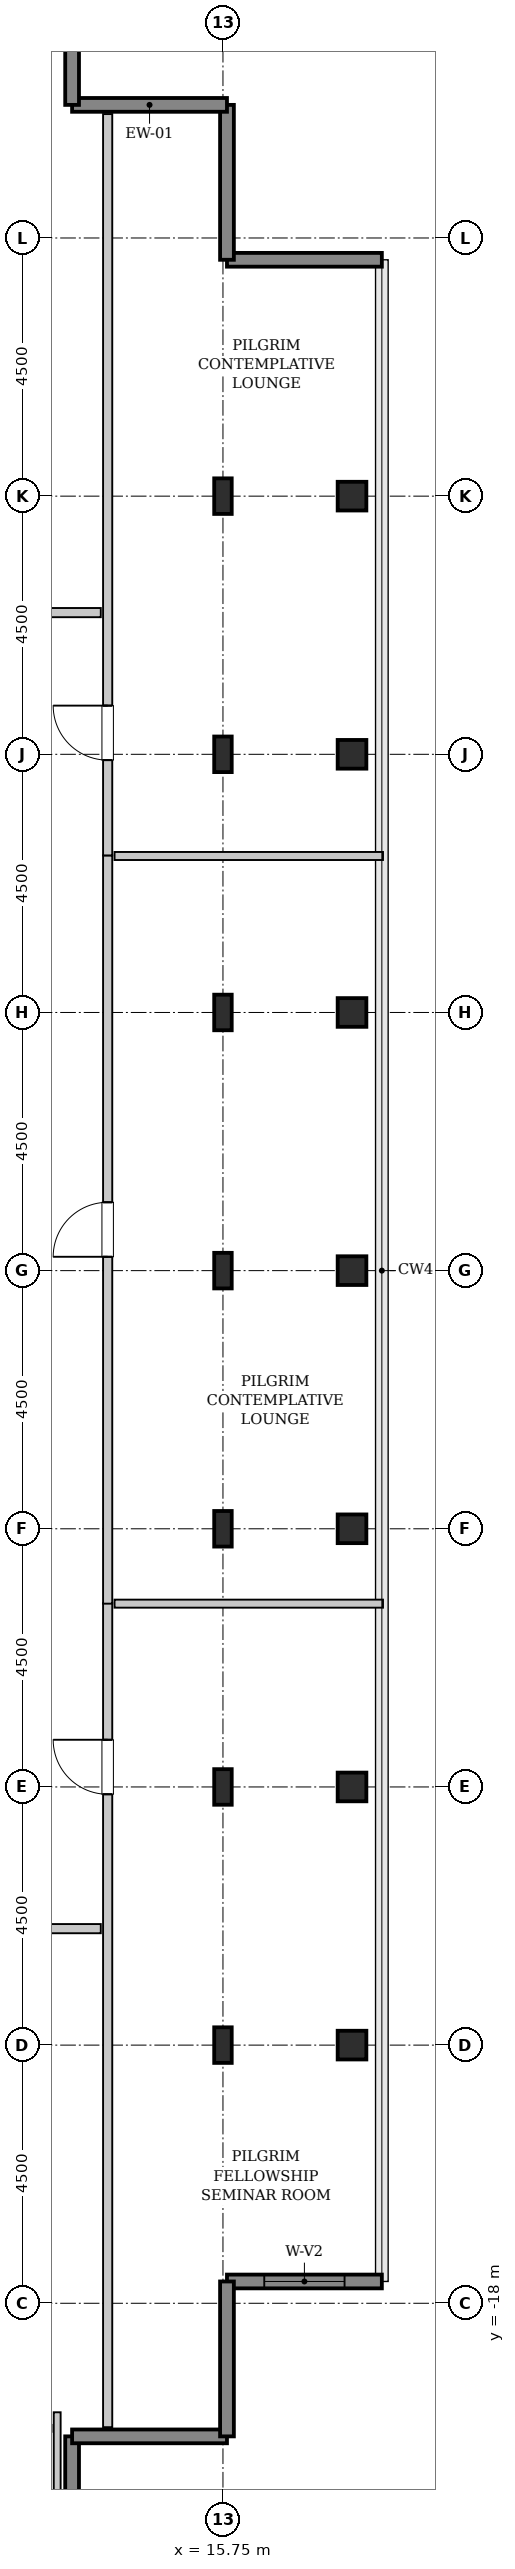
"""IFC4 building model, lengths in metres.
Left out: names, types, materials, properties, quantities, classifications, styles, units other than length and angle.
Written with IfcOpenShell. Run it as: python <this file> out.ifc"""

import sys

from ifc_helpers import new_model, si_unit, direction, frame, frame_2d, origin, origin_2d, place, context, subcontext, project, spatial, rectangle, hollow_rectangle, i_section, extrude, source, transform, mapped, element, fill, save


model = new_model("IFC4")
c1 = context("Model", 3, precision=1e-05, world=origin(), true_north=direction((0.0, 1.0)))
c2 = subcontext(c1, "Body", "Model", "MODEL_VIEW")
j1 = project(units=[si_unit("LENGTHUNIT", "METRE"), si_unit("PLANEANGLEUNIT", "RADIAN")], contexts=[c1])
p1 = place(None, origin())
s1 = spatial("IfcSite", under=j1, at=p1, CompositionType="ELEMENT")
p2 = place(p1, origin())
s2 = spatial("IfcBuilding", under=s1, at=p2, CompositionType="ELEMENT")
p3 = place(p2, frame((0.0, 0.0, 302.6)))
s3 = spatial("IfcBuildingStorey", under=s2, at=p3, CompositionType="ELEMENT", Elevation=302.6)
m1 = source(origin(), c2, "Body", "SweptSolid", [
    extrude(i_section(OverallWidth=0.305, OverallDepth=0.62, WebThickness=0.021, FlangeThickness=0.04, FilletRadius=0.027, at=origin_2d()), origin(), (0.0, 0.0, 1.0), 3.8),
])
for number, where, z_axis, x_axis in (
    (1, (15.75, -13.5, 0.0), (0.0, 0.0, 1.0), (1.0, 0.0, 0.0)),
    (2, (15.75, -9.0, 0.0), (0.0, 0.0, 1.0), (1.0, 0.0, 0.0)),
    (3, (15.75, -4.5, 0.0), (0.0, 0.0, 1.0), (1.0, 0.0, 0.0)),
    (4, (15.75, 0.0, 0.0), (0.0, 0.0, 1.0), (1.0, 0.0, 0.0)),
    (5, (15.75, 4.5, 0.0), (0.0, 0.0, 1.0), (1.0, 0.0, 0.0)),
    (6, (15.75, 9.0, 0.0), (0.0, 0.0, 1.0), (1.0, 0.0, 0.0)),
    (7, (15.75, 13.5, 0.0), (0.0, 0.0, 1.0), (1.0, 0.0, 0.0)),
):
    element("IfcColumn", number, at=place(p3, frame(where, z_axis=z_axis, x_axis=x_axis)), inside=s3, PredefinedType="COLUMN", context=c2, shape_type="MappedRepresentation", body=[
        mapped(m1, transform((0.0, 0.0, 0.0), x_axis=(1.0, 0.0, 0.0), y_axis=(0.0, 1.0, 0.0), z_axis=(0.0, 0.0, 1.0), scale=1.0)),
    ])
m2 = source(origin(), c2, "Body", "SweptSolid", [
    extrude(hollow_rectangle(XDim=0.5, YDim=0.5, WallThickness=0.025, InnerFilletRadius=0.025, OuterFilletRadius=0.05, at=origin_2d()), origin(), (0.0, 0.0, 1.0), 3.8),
])
for number, where, z_axis, x_axis in (
    (8, (18.0, -13.5, 0.0), (0.0, 0.0, 1.0), (1.0, 0.0, 0.0)),
    (9, (18.0, -9.0, 0.0), (0.0, 0.0, 1.0), (1.0, 0.0, 0.0)),
    (10, (18.0, -4.5, 0.0), (0.0, 0.0, 1.0), (1.0, 0.0, 0.0)),
    (11, (18.0, 0.0, 0.0), (0.0, 0.0, 1.0), (1.0, 0.0, 0.0)),
    (12, (18.0, 4.5, 0.0), (0.0, 0.0, 1.0), (1.0, 0.0, 0.0)),
    (13, (18.0, 9.0, 0.0), (0.0, 0.0, 1.0), (1.0, 0.0, 0.0)),
    (14, (18.0, 13.5, 0.0), (0.0, 0.0, 1.0), (1.0, 0.0, 0.0)),
):
    element("IfcColumn", number, at=place(p3, frame(where, z_axis=z_axis, x_axis=x_axis)), inside=s3, PredefinedType="COLUMN", context=c2, shape_type="MappedRepresentation", body=[
        mapped(m2, transform((0.0, 0.0, 0.0), x_axis=(1.0, 0.0, 0.0), y_axis=(0.0, 1.0, 0.0), z_axis=(0.0, 0.0, 1.0), scale=1.0)),
    ])
m3 = source(origin(), c2, "Body", "SweptSolid", [
    extrude(rectangle(XDim=2.7, YDim=0.24, at=frame_2d((1.35, 0.0))), origin(), (0.0, 0.0, 1.0), 3.55),
])
p4 = place(p3, frame((15.82, -17.62, 0.0), z_axis=(0.0, 0.0, 1.0), x_axis=(1.0, 0.0, 0.0)))
e15 = element("IfcWall", 15, at=p4, inside=s3, PredefinedType="SHEAR", context=c2, shape_type="MappedRepresentation", body=[
    mapped(m3, transform((0.0, 0.0, 0.0), x_axis=(1.0, 0.0, 0.0), y_axis=(0.0, 1.0, 0.0), z_axis=(0.0, 0.0, 1.0), scale=1.0)),
])
p5 = place(p4, frame((0.65, 0.0, 0.85)))
e16 = element("IfcOpeningElement", 16, at=p5, cuts=e15, PredefinedType="OPENING", context=c2, shape_type="SweptSolid", body=[
    extrude(rectangle(XDim=1.4, YDim=1.8, at=frame_2d((0.7, 0.9))), frame((0.0, 0.13, 0.0), z_axis=(0.0, -1.0, 0.0), x_axis=(1.0, 0.0, 0.0)), (0.0, 0.0, 1.0), 0.26),
])
for number, where, z_axis, x_axis in (
    (17, (18.52, 17.62, 0.0), (0.0, 0.0, 1.0), (-1.0, 0.0, 0.0)),
    (18, (15.82, 17.62, 0.0), (0.0, 0.0, 1.0), (0.0, 1.0, 0.0)),
    (19, (15.82, 20.32, 0.0), (0.0, 0.0, 1.0), (-1.0, 0.0, 0.0)),
    (20, (13.12, 20.32, 0.0), (0.0, 0.0, 1.0), (0.0, 1.0, 0.0)),
    (21, (13.12, -23.02, 0.0), (0.0, 0.0, 1.0), (0.0, 1.0, 0.0)),
    (22, (13.12, -20.32, 0.0), (0.0, 0.0, 1.0), (1.0, 0.0, 0.0)),
    (23, (15.82, -20.32, 0.0), (0.0, 0.0, 1.0), (0.0, 1.0, 0.0)),
):
    element("IfcWall", number, at=place(p3, frame(where, z_axis=z_axis, x_axis=x_axis)), inside=s3, PredefinedType="SHEAR", context=c2, shape_type="MappedRepresentation", body=[
        mapped(m3, transform((0.0, 0.0, 0.0), x_axis=(1.0, 0.0, 0.0), y_axis=(0.0, 1.0, 0.0), z_axis=(0.0, 0.0, 1.0), scale=1.0)),
    ])
m4 = source(origin(), c2, "Body", "SweptSolid", [
    extrude(rectangle(XDim=2.76, YDim=0.12, at=frame_2d((1.38, 0.0))), origin(), (0.0, 0.0, 1.0), 3.535),
])
p6 = place(p3, frame((12.86, -22.66, 0.0), z_axis=(0.0, 0.0, 1.0), x_axis=(0.0, 1.0, 0.0)))
e24 = element("IfcWall", 24, at=p6, inside=s3, PredefinedType="PLUMBINGWALL", context=c2, shape_type="MappedRepresentation", body=[
    mapped(m4, transform((0.0, 0.0, 0.0), x_axis=(1.0, 0.0, 0.0), y_axis=(0.0, 1.0, 0.0), z_axis=(0.0, 0.0, 1.0), scale=1.0)),
])
m5 = source(origin(), c2, "Body", "SweptSolid", [
    extrude(rectangle(XDim=14.365, YDim=0.16, at=frame_2d((7.183, 0.0))), origin(), (0.0, 0.0, 1.0), 3.535),
])
p7 = place(p3, frame((13.74, -20.16, 0.0), z_axis=(0.0, 0.0, 1.0), x_axis=(0.0, 1.0, 0.0)))
e25 = element("IfcWall", 25, at=p7, inside=s3, PredefinedType="PARTITIONING", context=c2, shape_type="MappedRepresentation", body=[
    mapped(m5, transform((0.0, 0.0, 0.0), x_axis=(1.0, 0.0, 0.0), y_axis=(0.0, 1.0, 0.0), z_axis=(0.0, 0.0, 1.0), scale=1.0)),
])
p8 = place(p7, frame((11.032, 0.0, 0.0)))
e26 = element("IfcOpeningElement", 26, at=p8, cuts=e25, PredefinedType="OPENING", context=c2, shape_type="SweptSolid", body=[
    extrude(rectangle(XDim=0.95, YDim=2.1, at=frame_2d((0.475, 1.05))), frame((0.0, 0.09, 0.0), z_axis=(0.0, -1.0, 0.0), x_axis=(1.0, 0.0, 0.0)), (0.0, 0.0, 1.0), 0.18),
])
m6 = source(origin(), c2, "Body", "SweptSolid", [
    extrude(rectangle(XDim=4.68, YDim=0.14, at=frame_2d((2.34, 0.0))), origin(), (0.0, 0.0, 1.0), 3.535),
])
p9 = place(p3, frame((13.86, -5.805, 0.0), z_axis=(0.0, 0.0, 1.0), x_axis=(1.0, 0.0, 0.0)))
e27 = element("IfcWall", 27, at=p9, inside=s3, PredefinedType="PARTITIONING", context=c2, shape_type="MappedRepresentation", body=[
    mapped(m6, transform((0.0, 0.0, 0.0), x_axis=(1.0, 0.0, 0.0), y_axis=(0.0, 1.0, 0.0), z_axis=(0.0, 0.0, 1.0), scale=1.0)),
])
m7 = source(origin(), c2, "Body", "SweptSolid", [
    extrude(rectangle(XDim=13.042, YDim=0.16, at=frame_2d((6.521, 0.0))), origin(), (0.0, 0.0, 1.0), 3.535),
])
p10 = place(p3, frame((13.74, -5.805, 0.0), z_axis=(0.0, 0.0, 1.0), x_axis=(0.0, 1.0, 0.0)))
e28 = element("IfcWall", 28, at=p10, inside=s3, PredefinedType="PARTITIONING", context=c2, shape_type="MappedRepresentation", body=[
    mapped(m7, transform((0.0, 0.0, 0.0), x_axis=(1.0, 0.0, 0.0), y_axis=(0.0, 1.0, 0.0), z_axis=(0.0, 0.0, 1.0), scale=1.0)),
])
p11 = place(p10, frame((6.046, 0.0, 0.0)))
e29 = element("IfcOpeningElement", 29, at=p11, cuts=e28, PredefinedType="OPENING", context=c2, shape_type="SweptSolid", body=[
    extrude(rectangle(XDim=0.95, YDim=2.1, at=frame_2d((0.475, 1.05))), frame((0.0, 0.09, 0.0), z_axis=(0.0, -1.0, 0.0), x_axis=(1.0, 0.0, 0.0)), (0.0, 0.0, 1.0), 0.18),
])
p12 = place(p3, frame((13.86, 7.228, 0.0), z_axis=(0.0, 0.0, 1.0), x_axis=(1.0, 0.0, 0.0)))
e30 = element("IfcWall", 30, at=p12, inside=s3, PredefinedType="PARTITIONING", context=c2, shape_type="MappedRepresentation", body=[
    mapped(m6, transform((0.0, 0.0, 0.0), x_axis=(1.0, 0.0, 0.0), y_axis=(0.0, 1.0, 0.0), z_axis=(0.0, 0.0, 1.0), scale=1.0)),
])
m8 = source(origin(), c2, "Body", "SweptSolid", [
    extrude(rectangle(XDim=12.922, YDim=0.16, at=frame_2d((6.461, 0.0))), origin(), (0.0, 0.0, 1.0), 3.535),
])
p13 = place(p3, frame((13.74, 7.238, 0.0), z_axis=(0.0, 0.0, 1.0), x_axis=(0.0, 1.0, 0.0)))
e31 = element("IfcWall", 31, at=p13, inside=s3, PredefinedType="PARTITIONING", context=c2, shape_type="MappedRepresentation", body=[
    mapped(m8, transform((0.0, 0.0, 0.0), x_axis=(1.0, 0.0, 0.0), y_axis=(0.0, 1.0, 0.0), z_axis=(0.0, 0.0, 1.0), scale=1.0)),
])
p14 = place(p13, frame((1.661, 0.0, 0.0)))
e32 = element("IfcOpeningElement", 32, at=p14, cuts=e31, PredefinedType="OPENING", context=c2, shape_type="SweptSolid", body=[
    extrude(rectangle(XDim=0.95, YDim=2.1, at=frame_2d((0.475, 1.05))), frame((0.0, 0.09, 0.0), z_axis=(0.0, -1.0, 0.0), x_axis=(1.0, 0.0, 0.0)), (0.0, 0.0, 1.0), 0.18),
])
m9 = source(origin(), c2, "Body", "SweptSolid", [
    extrude(rectangle(XDim=5.225, YDim=0.16, at=frame_2d((2.613, 0.0))), origin(), (0.0, 0.0, 1.0), 3.535),
])
p15 = place(p3, frame((8.395, 11.47, 0.0), z_axis=(0.0, 0.0, 1.0), x_axis=(1.0, 0.0, 0.0)))
e33 = element("IfcWall", 33, at=p15, inside=s3, PredefinedType="PARTITIONING", context=c2, shape_type="MappedRepresentation", body=[
    mapped(m9, transform((0.0, 0.0, 0.0), x_axis=(1.0, 0.0, 0.0), y_axis=(0.0, 1.0, 0.0), z_axis=(0.0, 0.0, 1.0), scale=1.0)),
])
p16 = place(p15, frame((2.137, 0.0, 0.0)))
e34 = element("IfcOpeningElement", 34, at=p16, cuts=e33, PredefinedType="OPENING", context=c2, shape_type="SweptSolid", body=[
    extrude(rectangle(XDim=0.95, YDim=2.1, at=frame_2d((0.475, 1.05))), frame((0.0, 0.09, 0.0), z_axis=(0.0, -1.0, 0.0), x_axis=(1.0, 0.0, 0.0)), (0.0, 0.0, 1.0), 0.18),
])
m10 = source(origin(), c2, "Body", "SweptSolid", [
    extrude(rectangle(XDim=3.56, YDim=0.16, at=frame_2d((1.78, 0.0))), origin(), (0.0, 0.0, 1.0), 3.535),
])
p17 = place(p3, frame((10.06, -11.47, 0.0), z_axis=(0.0, 0.0, 1.0), x_axis=(1.0, 0.0, 0.0)))
e35 = element("IfcWall", 35, at=p17, inside=s3, PredefinedType="PARTITIONING", context=c2, shape_type="MappedRepresentation", body=[
    mapped(m10, transform((0.0, 0.0, 0.0), x_axis=(1.0, 0.0, 0.0), y_axis=(0.0, 1.0, 0.0), z_axis=(0.0, 0.0, 1.0), scale=1.0)),
])
p18 = place(p17, frame((1.305, 0.0, 0.0)))
e36 = element("IfcOpeningElement", 36, at=p18, cuts=e35, PredefinedType="OPENING", context=c2, shape_type="SweptSolid", body=[
    extrude(rectangle(XDim=0.95, YDim=2.1, at=frame_2d((0.475, 1.05))), frame((0.0, 0.09, 0.0), z_axis=(0.0, -1.0, 0.0), x_axis=(1.0, 0.0, 0.0)), (0.0, 0.0, 1.0), 0.18),
])
m11 = source(origin(), c2, "Body", "SweptSolid", [
    extrude(rectangle(XDim=1.4, YDim=1.8, at=frame_2d((0.7, 0.9))), frame((0.0, 0.03, 0.0), z_axis=(0.0, -1.0, 0.0), x_axis=(1.0, 0.0, 0.0)), (0.0, 0.0, 1.0), 0.06),
])
p19 = place(p5, origin())
e37 = element("IfcWindow", 37, at=p19, inside=s3, PartitioningType="SINGLE_PANEL", PredefinedType="WINDOW", context=c2, shape_type="MappedRepresentation", body=[
    mapped(m11, transform((0.0, 0.0, 0.0), x_axis=(1.0, 0.0, 0.0), y_axis=(0.0, 1.0, 0.0), z_axis=(0.0, 0.0, 1.0), scale=1.0)),
])
fill(e16, e37)
m12 = source(origin(), c2, "Body", "SweptSolid", [
    extrude(rectangle(XDim=0.95, YDim=2.1, at=frame_2d((0.475, 1.05))), frame((0.0, 0.025, 0.0), z_axis=(0.0, -1.0, 0.0), x_axis=(1.0, 0.0, 0.0)), (0.0, 0.0, 1.0), 0.05),
])
p20 = place(p8, origin())
e38 = element("IfcDoor", 38, at=p20, inside=s3, OperationType="SINGLE_SWING_RIGHT", PredefinedType="DOOR", context=c2, shape_type="MappedRepresentation", body=[
    mapped(m12, transform((0.0, 0.0, 0.0), x_axis=(1.0, 0.0, 0.0), y_axis=(0.0, 1.0, 0.0), z_axis=(0.0, 0.0, 1.0), scale=1.0)),
])
fill(e26, e38)
p21 = place(p11, origin())
e39 = element("IfcDoor", 39, at=p21, inside=s3, OperationType="SINGLE_SWING_LEFT", PredefinedType="DOOR", context=c2, shape_type="MappedRepresentation", body=[
    mapped(m12, transform((0.0, 0.0, 0.0), x_axis=(1.0, 0.0, 0.0), y_axis=(0.0, 1.0, 0.0), z_axis=(0.0, 0.0, 1.0), scale=1.0)),
])
fill(e29, e39)
p22 = place(p14, origin())
e40 = element("IfcDoor", 40, at=p22, inside=s3, OperationType="SINGLE_SWING_RIGHT", PredefinedType="DOOR", context=c2, shape_type="MappedRepresentation", body=[
    mapped(m12, transform((0.0, 0.0, 0.0), x_axis=(1.0, 0.0, 0.0), y_axis=(0.0, 1.0, 0.0), z_axis=(0.0, 0.0, 1.0), scale=1.0)),
])
fill(e32, e40)
save(model, sys.argv[1])
